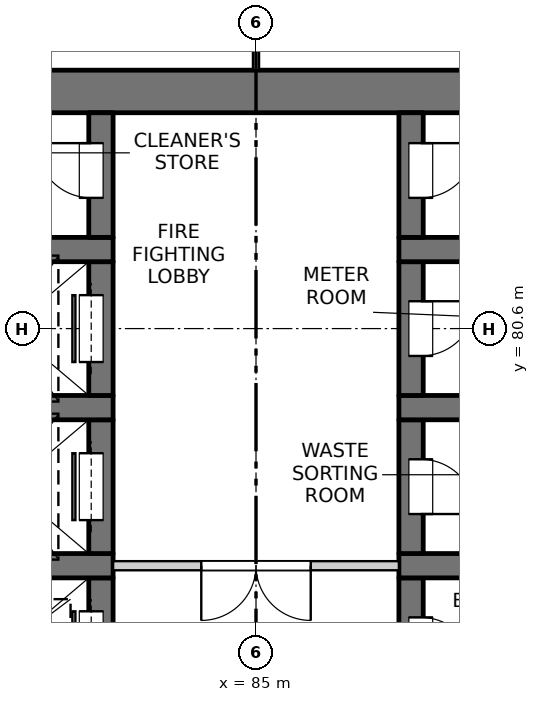
"""IFC4 building model, lengths in metres.
Left out: names, types, materials, properties, quantities, classifications, styles, units other than length and angle.
Written with IfcOpenShell. Run it as: python <this file> out.ifc"""

import sys

from ifc_helpers import new_model, si_unit, direction, frame, frame_2d, origin, place, context, subcontext, project, spatial, rectangle, extrude, element, fill, save


model = new_model("IFC4")
c1 = context("Model", 3, precision=1e-05, world=origin(), true_north=direction((0.0, 1.0)))
c2 = subcontext(c1, "Body", "Model", "MODEL_VIEW")
j1 = project(units=[si_unit("LENGTHUNIT", "METRE"), si_unit("PLANEANGLEUNIT", "RADIAN")], contexts=[c1])
p1 = place(None, origin())
s1 = spatial("IfcSite", under=j1, at=p1, CompositionType="ELEMENT")
p2 = place(p1, origin())
s2 = spatial("IfcBuilding", under=s1, at=p2, CompositionType="ELEMENT")
p3 = place(p2, frame((0.0, 0.0, 43.3)))
s3 = spatial("IfcBuildingStorey", under=s2, at=p3, CompositionType="ELEMENT", Elevation=43.3)
p4 = place(p3, frame((75.6, 84.5, -0.25), z_axis=(0.0, 0.0, 1.0), x_axis=(1.0, 0.0, 0.0)))
e1 = element("IfcWall", 1, at=p4, inside=s3, PredefinedType="SOLIDWALL", context=c2, shape_type="SweptSolid", body=[
    extrude(rectangle(XDim=18.8, YDim=0.7, at=frame_2d((9.4, 0.0))), origin(), (0.0, 0.0, 1.0), 3.35),
])
p5 = place(p3, frame((82.45, 74.3, -0.25), z_axis=(0.0, 0.0, 1.0), x_axis=(0.0, 1.0, 0.0)))
e2 = element("IfcWall", 2, at=p5, inside=s3, PredefinedType="SOLIDWALL", context=c2, shape_type="SweptSolid", body=[
    extrude(rectangle(XDim=2.2, YDim=0.4, at=frame_2d((1.1, 0.0))), origin(), (0.0, 0.0, 1.0), 3.35),
])
p6 = place(p5, frame((0.55, 0.0, 0.25)))
e3 = element("IfcOpeningElement", 3, at=p6, cuts=e2, PredefinedType="OPENING", context=c2, shape_type="SweptSolid", body=[
    extrude(rectangle(XDim=1.1, YDim=2.1, at=frame_2d((0.55, 1.05))), frame((0.0, 0.21, 0.0), z_axis=(0.0, -1.0, 0.0), x_axis=(1.0, 0.0, 0.0)), (0.0, 0.0, 1.0), 0.42),
])
p7 = place(p3, frame((79.65, 76.7, -0.25), z_axis=(0.0, 0.0, 1.0), x_axis=(1.0, 0.0, 0.0)))
e4 = element("IfcWall", 4, at=p7, inside=s3, PredefinedType="SOLIDWALL", context=c2, shape_type="SweptSolid", body=[
    extrude(rectangle(XDim=3.0, YDim=0.4, at=frame_2d((1.5, 0.0))), origin(), (0.0, 0.0, 1.0), 3.35),
])
p8 = place(p3, frame((82.45, 76.9, -0.25), z_axis=(0.0, 0.0, 1.0), x_axis=(0.0, 1.0, 0.0)))
e5 = element("IfcWall", 5, at=p8, inside=s3, PredefinedType="SOLIDWALL", context=c2, shape_type="SweptSolid", body=[
    extrude(rectangle(XDim=2.2, YDim=0.4, at=frame_2d((1.1, 0.0))), origin(), (0.0, 0.0, 1.0), 3.35),
])
p9 = place(p8, frame((0.55, 0.0, 0.25)))
e6 = element("IfcOpeningElement", 6, at=p9, cuts=e5, PredefinedType="OPENING", context=c2, shape_type="SweptSolid", body=[
    extrude(rectangle(XDim=1.1, YDim=2.1, at=frame_2d((0.55, 1.05))), frame((0.0, 0.21, 0.0), z_axis=(0.0, -1.0, 0.0), x_axis=(1.0, 0.0, 0.0)), (0.0, 0.0, 1.0), 0.42),
])
p10 = place(p3, frame((79.65, 79.3, -0.25), z_axis=(0.0, 0.0, 1.0), x_axis=(1.0, 0.0, 0.0)))
e7 = element("IfcWall", 7, at=p10, inside=s3, PredefinedType="SOLIDWALL", context=c2, shape_type="SweptSolid", body=[
    extrude(rectangle(XDim=3.0, YDim=0.4, at=frame_2d((1.5, 0.0))), origin(), (0.0, 0.0, 1.0), 3.35),
])
p11 = place(p3, frame((82.45, 79.5, -0.25), z_axis=(0.0, 0.0, 1.0), x_axis=(0.0, 1.0, 0.0)))
e8 = element("IfcWall", 8, at=p11, inside=s3, PredefinedType="SOLIDWALL", context=c2, shape_type="SweptSolid", body=[
    extrude(rectangle(XDim=2.2, YDim=0.4, at=frame_2d((1.1, 0.0))), origin(), (0.0, 0.0, 1.0), 3.35),
])
p12 = place(p11, frame((0.55, 0.0, 0.25)))
e9 = element("IfcOpeningElement", 9, at=p12, cuts=e8, PredefinedType="OPENING", context=c2, shape_type="SweptSolid", body=[
    extrude(rectangle(XDim=1.1, YDim=2.1, at=frame_2d((0.55, 1.05))), frame((0.0, 0.21, 0.0), z_axis=(0.0, -1.0, 0.0), x_axis=(1.0, 0.0, 0.0)), (0.0, 0.0, 1.0), 0.42),
])
p13 = place(p3, frame((79.65, 81.9, -0.25), z_axis=(0.0, 0.0, 1.0), x_axis=(1.0, 0.0, 0.0)))
e10 = element("IfcWall", 10, at=p13, inside=s3, PredefinedType="SOLIDWALL", context=c2, shape_type="SweptSolid", body=[
    extrude(rectangle(XDim=3.0, YDim=0.4, at=frame_2d((1.5, 0.0))), origin(), (0.0, 0.0, 1.0), 3.35),
])
p14 = place(p3, frame((82.45, 82.1, -0.25), z_axis=(0.0, 0.0, 1.0), x_axis=(0.0, 1.0, 0.0)))
e11 = element("IfcWall", 11, at=p14, inside=s3, PredefinedType="SOLIDWALL", context=c2, shape_type="SweptSolid", body=[
    extrude(rectangle(XDim=2.05, YDim=0.4, at=frame_2d((1.025, 0.0))), origin(), (0.0, 0.0, 1.0), 3.35),
])
p15 = place(p14, frame((0.65, 0.0, 0.25)))
e12 = element("IfcOpeningElement", 12, at=p15, cuts=e11, PredefinedType="OPENING", context=c2, shape_type="SweptSolid", body=[
    extrude(rectangle(XDim=0.9, YDim=2.1, at=frame_2d((0.45, 1.05))), frame((0.0, 0.21, 0.0), z_axis=(0.0, -1.0, 0.0), x_axis=(1.0, 0.0, 0.0)), (0.0, 0.0, 1.0), 0.42),
])
p16 = place(p3, frame((87.55, 74.3, -0.25), z_axis=(0.0, 0.0, 1.0), x_axis=(0.0, 1.0, 0.0)))
e13 = element("IfcWall", 13, at=p16, inside=s3, PredefinedType="SOLIDWALL", context=c2, shape_type="SweptSolid", body=[
    extrude(rectangle(XDim=2.2, YDim=0.4, at=frame_2d((1.1, 0.0))), origin(), (0.0, 0.0, 1.0), 3.35),
])
p17 = place(p16, frame((0.65, 0.0, 0.25)))
e14 = element("IfcOpeningElement", 14, at=p17, cuts=e13, PredefinedType="OPENING", context=c2, shape_type="SweptSolid", body=[
    extrude(rectangle(XDim=0.9, YDim=2.1, at=frame_2d((0.45, 1.05))), frame((0.0, 0.21, 0.0), z_axis=(0.0, -1.0, 0.0), x_axis=(1.0, 0.0, 0.0)), (0.0, 0.0, 1.0), 0.42),
])
p18 = place(p3, frame((87.35, 76.7, -0.25), z_axis=(0.0, 0.0, 1.0), x_axis=(1.0, 0.0, 0.0)))
e15 = element("IfcWall", 15, at=p18, inside=s3, PredefinedType="SOLIDWALL", context=c2, shape_type="SweptSolid", body=[
    extrude(rectangle(XDim=3.0, YDim=0.4, at=frame_2d((1.5, 0.0))), origin(), (0.0, 0.0, 1.0), 3.35),
])
p19 = place(p3, frame((87.55, 76.9, -0.25), z_axis=(0.0, 0.0, 1.0), x_axis=(0.0, 1.0, 0.0)))
e16 = element("IfcWall", 16, at=p19, inside=s3, PredefinedType="SOLIDWALL", context=c2, shape_type="SweptSolid", body=[
    extrude(rectangle(XDim=2.2, YDim=0.4, at=frame_2d((1.1, 0.0))), origin(), (0.0, 0.0, 1.0), 3.35),
])
p20 = place(p19, frame((0.65, 0.0, 0.25)))
e17 = element("IfcOpeningElement", 17, at=p20, cuts=e16, PredefinedType="OPENING", context=c2, shape_type="SweptSolid", body=[
    extrude(rectangle(XDim=0.9, YDim=2.1, at=frame_2d((0.45, 1.05))), frame((0.0, 0.21, 0.0), z_axis=(0.0, -1.0, 0.0), x_axis=(1.0, 0.0, 0.0)), (0.0, 0.0, 1.0), 0.42),
])
p21 = place(p3, frame((87.35, 79.3, -0.25), z_axis=(0.0, 0.0, 1.0), x_axis=(1.0, 0.0, 0.0)))
e18 = element("IfcWall", 18, at=p21, inside=s3, PredefinedType="SOLIDWALL", context=c2, shape_type="SweptSolid", body=[
    extrude(rectangle(XDim=3.0, YDim=0.4, at=frame_2d((1.5, 0.0))), origin(), (0.0, 0.0, 1.0), 3.35),
])
p22 = place(p3, frame((87.55, 79.5, -0.25), z_axis=(0.0, 0.0, 1.0), x_axis=(0.0, 1.0, 0.0)))
e19 = element("IfcWall", 19, at=p22, inside=s3, PredefinedType="SOLIDWALL", context=c2, shape_type="SweptSolid", body=[
    extrude(rectangle(XDim=2.2, YDim=0.4, at=frame_2d((1.1, 0.0))), origin(), (0.0, 0.0, 1.0), 3.35),
])
p23 = place(p22, frame((0.65, 0.0, 0.25)))
e20 = element("IfcOpeningElement", 20, at=p23, cuts=e19, PredefinedType="OPENING", context=c2, shape_type="SweptSolid", body=[
    extrude(rectangle(XDim=0.9, YDim=2.1, at=frame_2d((0.45, 1.05))), frame((0.0, 0.21, 0.0), z_axis=(0.0, -1.0, 0.0), x_axis=(1.0, 0.0, 0.0)), (0.0, 0.0, 1.0), 0.42),
])
p24 = place(p3, frame((87.35, 81.9, -0.25), z_axis=(0.0, 0.0, 1.0), x_axis=(1.0, 0.0, 0.0)))
e21 = element("IfcWall", 21, at=p24, inside=s3, PredefinedType="SOLIDWALL", context=c2, shape_type="SweptSolid", body=[
    extrude(rectangle(XDim=3.0, YDim=0.4, at=frame_2d((1.5, 0.0))), origin(), (0.0, 0.0, 1.0), 3.35),
])
p25 = place(p3, frame((87.55, 82.1, -0.25), z_axis=(0.0, 0.0, 1.0), x_axis=(0.0, 1.0, 0.0)))
e22 = element("IfcWall", 22, at=p25, inside=s3, PredefinedType="SOLIDWALL", context=c2, shape_type="SweptSolid", body=[
    extrude(rectangle(XDim=2.05, YDim=0.4, at=frame_2d((1.025, 0.0))), origin(), (0.0, 0.0, 1.0), 3.35),
])
p26 = place(p25, frame((0.65, 0.0, 0.25)))
e23 = element("IfcOpeningElement", 23, at=p26, cuts=e22, PredefinedType="OPENING", context=c2, shape_type="SweptSolid", body=[
    extrude(rectangle(XDim=0.9, YDim=2.1, at=frame_2d((0.45, 1.05))), frame((0.0, 0.21, 0.0), z_axis=(0.0, -1.0, 0.0), x_axis=(1.0, 0.0, 0.0)), (0.0, 0.0, 1.0), 0.42),
])
p27 = place(p3, frame((82.65, 76.7, 0.0), z_axis=(0.0, 0.0, 1.0), x_axis=(1.0, 0.0, 0.0)))
e24 = element("IfcWall", 24, at=p27, inside=s3, PredefinedType="PARTITIONING", context=c2, shape_type="SweptSolid", body=[
    extrude(rectangle(XDim=4.7, YDim=0.15, at=frame_2d((2.35, 0.0))), origin(), (0.0, 0.0, 1.0), 3.1),
])
p28 = place(p27, frame((1.45, 0.0, 0.0)))
e25 = element("IfcOpeningElement", 25, at=p28, cuts=e24, PredefinedType="OPENING", context=c2, shape_type="SweptSolid", body=[
    extrude(rectangle(XDim=1.8, YDim=2.1, at=frame_2d((0.9, 1.05))), frame((0.0, 0.085, 0.0), z_axis=(0.0, -1.0, 0.0), x_axis=(1.0, 0.0, 0.0)), (0.0, 0.0, 1.0), 0.17),
])
p29 = place(p3, frame((85.0, 84.85, 0.0), z_axis=(0.0, 0.0, 1.0), x_axis=(0.0, 1.0, 0.0)))
e26 = element("IfcWall", 26, at=p29, inside=s3, PredefinedType="PARTITIONING", context=c2, shape_type="SweptSolid", body=[
    extrude(rectangle(XDim=3.25, YDim=0.1, at=frame_2d((1.625, 0.0))), origin(), (0.0, 0.0, 1.0), 3.1),
])
p30 = place(p29, frame((1.15, 0.0, 0.0)))
e27 = element("IfcOpeningElement", 27, at=p30, cuts=e26, PredefinedType="OPENING", context=c2, shape_type="SweptSolid", body=[
    extrude(rectangle(XDim=0.9, YDim=2.1, at=frame_2d((0.45, 1.05))), frame((0.0, 0.06, 0.0), z_axis=(0.0, -1.0, 0.0), x_axis=(1.0, 0.0, 0.0)), (0.0, 0.0, 1.0), 0.12),
])
p31 = place(p6, origin())
e28 = element("IfcDoor", 28, at=p31, inside=s3, OperationType="SLIDING_TO_LEFT", PredefinedType="DOOR", context=c2, shape_type="SweptSolid", body=[
    extrude(rectangle(XDim=1.1, YDim=2.1, at=frame_2d((0.55, 1.05))), frame((0.0, 0.185, 0.0), z_axis=(0.0, -1.0, 0.0), x_axis=(1.0, 0.0, 0.0)), (0.0, 0.0, 1.0), 0.05),
])
fill(e3, e28)
p32 = place(p17, origin())
e29 = element("IfcDoor", 29, at=p32, inside=s3, OperationType="SINGLE_SWING_RIGHT", PredefinedType="DOOR", context=c2, shape_type="SweptSolid", body=[
    extrude(rectangle(XDim=0.9, YDim=2.1, at=frame_2d((0.45, 1.05))), frame((0.0, -0.135, 0.0), z_axis=(0.0, -1.0, 0.0), x_axis=(1.0, 0.0, 0.0)), (0.0, 0.0, 1.0), 0.05),
])
fill(e14, e29)
p33 = place(p28, origin())
e30 = element("IfcDoor", 30, at=p33, inside=s3, OperationType="DOUBLE_DOOR_SINGLE_SWING", PredefinedType="DOOR", context=c2, shape_type="SweptSolid", body=[
    extrude(rectangle(XDim=1.8, YDim=2.1, at=frame_2d((0.9, 1.05))), frame((0.0, 0.025, 0.0), z_axis=(0.0, -1.0, 0.0), x_axis=(1.0, 0.0, 0.0)), (0.0, 0.0, 1.0), 0.05),
])
fill(e25, e30)
p34 = place(p9, origin())
e31 = element("IfcDoor", 31, at=p34, inside=s3, OperationType="SLIDING_TO_LEFT", PredefinedType="DOOR", context=c2, shape_type="SweptSolid", body=[
    extrude(rectangle(XDim=1.1, YDim=2.1, at=frame_2d((0.55, 1.05))), frame((0.0, 0.185, 0.0), z_axis=(0.0, -1.0, 0.0), x_axis=(1.0, 0.0, 0.0)), (0.0, 0.0, 1.0), 0.05),
])
fill(e6, e31)
p35 = place(p20, origin())
e32 = element("IfcDoor", 32, at=p35, inside=s3, OperationType="SINGLE_SWING_RIGHT", PredefinedType="DOOR", context=c2, shape_type="SweptSolid", body=[
    extrude(rectangle(XDim=0.9, YDim=2.1, at=frame_2d((0.45, 1.05))), frame((0.0, -0.135, 0.0), z_axis=(0.0, -1.0, 0.0), x_axis=(1.0, 0.0, 0.0)), (0.0, 0.0, 1.0), 0.05),
])
fill(e17, e32)
p36 = place(p12, origin())
e33 = element("IfcDoor", 33, at=p36, inside=s3, OperationType="SLIDING_TO_LEFT", PredefinedType="DOOR", context=c2, shape_type="SweptSolid", body=[
    extrude(rectangle(XDim=1.1, YDim=2.1, at=frame_2d((0.55, 1.05))), frame((0.0, 0.185, 0.0), z_axis=(0.0, -1.0, 0.0), x_axis=(1.0, 0.0, 0.0)), (0.0, 0.0, 1.0), 0.05),
])
fill(e9, e33)
p37 = place(p23, origin())
e34 = element("IfcDoor", 34, at=p37, inside=s3, OperationType="SINGLE_SWING_LEFT", PredefinedType="DOOR", context=c2, shape_type="SweptSolid", body=[
    extrude(rectangle(XDim=0.9, YDim=2.1, at=frame_2d((0.45, 1.05))), frame((0.0, -0.135, 0.0), z_axis=(0.0, -1.0, 0.0), x_axis=(1.0, 0.0, 0.0)), (0.0, 0.0, 1.0), 0.05),
])
fill(e20, e34)
p38 = place(p15, origin())
e35 = element("IfcDoor", 35, at=p38, inside=s3, OperationType="SINGLE_SWING_RIGHT", PredefinedType="DOOR", context=c2, shape_type="SweptSolid", body=[
    extrude(rectangle(XDim=0.9, YDim=2.1, at=frame_2d((0.45, 1.05))), frame((0.0, 0.185, 0.0), z_axis=(0.0, -1.0, 0.0), x_axis=(1.0, 0.0, 0.0)), (0.0, 0.0, 1.0), 0.05),
])
fill(e12, e35)
p39 = place(p26, origin())
e36 = element("IfcDoor", 36, at=p39, inside=s3, OperationType="SINGLE_SWING_LEFT", PredefinedType="DOOR", context=c2, shape_type="SweptSolid", body=[
    extrude(rectangle(XDim=0.9, YDim=2.1, at=frame_2d((0.45, 1.05))), frame((0.0, -0.135, 0.0), z_axis=(0.0, -1.0, 0.0), x_axis=(1.0, 0.0, 0.0)), (0.0, 0.0, 1.0), 0.05),
])
fill(e23, e36)
save(model, sys.argv[1])
